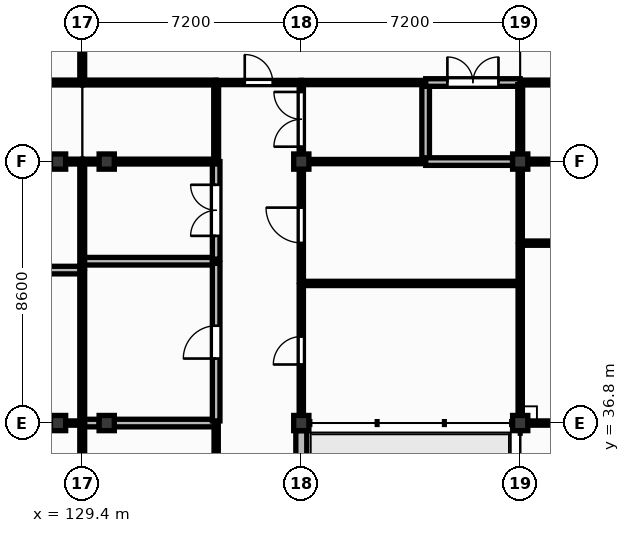
"""IFC4 building model, lengths in metres.
Left out: names, types, materials, properties, quantities, classifications, styles, units other than length and angle.
Written with IfcOpenShell. Run it as: python <this file> out.ifc"""

import sys

from ifc_helpers import new_model, si_unit, direction, frame, frame_2d, origin, origin_2d, place, context, subcontext, project, spatial, rectangle, extrude, element, fill, save


model = new_model("IFC4")
c1 = context("Model", 3, precision=1e-05, world=origin(), true_north=direction((0.0, 1.0)))
c2 = subcontext(c1, "Body", "Model", "MODEL_VIEW")
j1 = project(units=[si_unit("LENGTHUNIT", "METRE"), si_unit("PLANEANGLEUNIT", "RADIAN")], contexts=[c1])
p1 = place(None, origin())
s1 = spatial("IfcSite", under=j1, at=p1, CompositionType="ELEMENT")
p2 = place(p1, origin())
s2 = spatial("IfcBuilding", under=s1, at=p2, CompositionType="ELEMENT")
p3 = place(p2, frame((0.0, 0.0, 4.5)))
s3 = spatial("IfcBuildingStorey", under=s2, at=p3, CompositionType="ELEMENT", Elevation=4.5)
for number, where, z_axis, x_axis in (
    (1, (128.6, 36.8, 0.0), (0.0, 0.0, 1.0), (1.0, 0.0, 0.0)),
    (2, (128.6, 45.4, 0.0), (0.0, 0.0, 1.0), (1.0, 0.0, 0.0)),
    (3, (130.2, 36.8, 0.0), (0.0, 0.0, 1.0), (1.0, 0.0, 0.0)),
    (4, (130.2, 45.4, 0.0), (0.0, 0.0, 1.0), (1.0, 0.0, 0.0)),
    (5, (136.6, 36.8, 0.0), (0.0, 0.0, 1.0), (1.0, 0.0, 0.0)),
    (6, (136.6, 45.4, 0.0), (0.0, 0.0, 1.0), (1.0, 0.0, 0.0)),
    (7, (143.8, 36.8, 0.0), (0.0, 0.0, 1.0), (1.0, 0.0, 0.0)),
    (8, (143.8, 45.4, 0.0), (0.0, 0.0, 1.0), (1.0, 0.0, 0.0)),
):
    element("IfcColumn", number, at=place(p3, frame(where, z_axis=z_axis, x_axis=x_axis)), inside=s3, PredefinedType="COLUMN", context=c2, shape_type="SweptSolid", body=[
        extrude(rectangle(XDim=0.5, YDim=0.5, at=origin_2d()), origin(), (0.0, 0.0, 1.0), 4.22),
    ])
p4 = place(p3, frame((136.6, 27.45, 0.0), z_axis=(0.0, 0.0, 1.0), x_axis=(0.0, 1.0, 0.0)))
e9 = element("IfcWall", 9, at=p4, inside=s3, PredefinedType="SOLIDWALL", context=c2, shape_type="SweptSolid", body=[
    extrude(rectangle(XDim=9.1, YDim=0.36, at=frame_2d((4.55, 0.0))), origin(), (0.0, 0.0, 1.0), 3.52),
])
p5 = place(p4, frame((3.45, 0.0, 0.0)))
e10 = element("IfcOpeningElement", 10, at=p5, cuts=e9, PredefinedType="OPENING", context=c2, shape_type="SweptSolid", body=[
    extrude(rectangle(XDim=2.2, YDim=2.5, at=frame_2d((1.1, 1.25))), frame((0.0, 0.19, 0.0), z_axis=(0.0, -1.0, 0.0), x_axis=(1.0, 0.0, 0.0)), (0.0, 0.0, 1.0), 0.38),
])
p6 = place(p4, frame((0.915, 0.0, 1.5)))
e11 = element("IfcOpeningElement", 11, at=p6, cuts=e9, PredefinedType="OPENING", context=c2, shape_type="SweptSolid", body=[
    extrude(rectangle(XDim=1.68, YDim=1.25, at=frame_2d((0.84, 0.625))), frame((0.0, 0.19, 0.0), z_axis=(0.0, -1.0, 0.0), x_axis=(1.0, 0.0, 0.0)), (0.0, 0.0, 1.0), 0.38),
])
p7 = place(p4, frame((6.42, 0.0, 1.5)))
e12 = element("IfcOpeningElement", 12, at=p7, cuts=e9, PredefinedType="OPENING", context=c2, shape_type="SweptSolid", body=[
    extrude(rectangle(XDim=1.85, YDim=1.25, at=frame_2d((0.925, 0.625))), frame((0.0, 0.19, 0.0), z_axis=(0.0, -1.0, 0.0), x_axis=(1.0, 0.0, 0.0)), (0.0, 0.0, 1.0), 0.38),
])
p8 = place(p3, frame((128.85, 36.8, 0.0), z_axis=(0.0, 0.0, 1.0), x_axis=(1.0, 0.0, 0.0)))
e13 = element("IfcWall", 13, at=p8, inside=s3, PredefinedType="PARTITIONING", context=c2, shape_type="SweptSolid", body=[
    extrude(rectangle(XDim=0.545, YDim=0.14, at=frame_2d((0.272, 0.0))), origin(), (0.0, 0.0, 1.0), 4.18),
])
p9 = place(p3, frame((124.6, 41.831, 0.0), z_axis=(0.0, 0.0, 1.0), x_axis=(1.0, 0.0, 0.0)))
e14 = element("IfcWall", 14, at=p9, inside=s3, PredefinedType="SOLIDWALL", context=c2, shape_type="SweptSolid", body=[
    extrude(rectangle(XDim=4.795, YDim=0.25, at=frame_2d((2.397, 0.0))), origin(), (0.0, 0.0, 1.0), 4.18),
])
p10 = place(p3, frame((129.405, 36.8, 0.0), z_axis=(0.0, 0.0, 1.0), x_axis=(1.0, 0.0, 0.0)))
e15 = element("IfcWall", 15, at=p10, inside=s3, PredefinedType="SOLIDWALL", context=c2, shape_type="SweptSolid", body=[
    extrude(rectangle(XDim=0.545, YDim=0.25, at=frame_2d((0.272, 0.0))), origin(), (0.0, 0.0, 1.0), 4.18),
])
p11 = place(p3, frame((130.45, 36.8, 0.0), z_axis=(0.0, 0.0, 1.0), x_axis=(1.0, 0.0, 0.0)))
e16 = element("IfcWall", 16, at=p11, inside=s3, PredefinedType="SOLIDWALL", context=c2, shape_type="SweptSolid", body=[
    extrude(rectangle(XDim=3.35, YDim=0.25, at=frame_2d((1.675, 0.0))), origin(), (0.0, 0.0, 1.0), 3.52),
])
p12 = place(p3, frame((129.405, 42.123, 0.0), z_axis=(0.0, 0.0, 1.0), x_axis=(1.0, 0.0, 0.0)))
e17 = element("IfcWall", 17, at=p12, inside=s3, PredefinedType="SOLIDWALL", context=c2, shape_type="SweptSolid", body=[
    extrude(rectangle(XDim=4.395, YDim=0.25, at=frame_2d((2.198, 0.0))), origin(), (0.0, 0.0, 1.0), 4.18),
])
p13 = place(p3, frame((133.8, 31.091, 0.0), z_axis=(0.0, 0.0, 1.0), x_axis=(0.0, 1.0, 0.0)))
e18 = element("IfcWall", 18, at=p13, inside=s3, PredefinedType="PARTITIONING", context=c2, shape_type="SweptSolid", body=[
    extrude(rectangle(XDim=5.639, YDim=0.14, at=frame_2d((2.819, 0.0))), origin(), (0.0, 0.0, 1.0), 4.18),
])
p14 = place(p13, frame((2.24, 0.0, 0.0)))
e19 = element("IfcOpeningElement", 19, at=p14, cuts=e18, PredefinedType="OPENING", context=c2, shape_type="SweptSolid", body=[
    extrude(rectangle(XDim=1.16, YDim=2.1, at=frame_2d((0.58, 1.05))), frame((0.0, 0.08, 0.0), z_axis=(0.0, -1.0, 0.0), x_axis=(1.0, 0.0, 0.0)), (0.0, 0.0, 1.0), 0.16),
])
p15 = place(p3, frame((133.8, 36.87, 0.0), z_axis=(0.0, 0.0, 1.0), x_axis=(0.0, 1.0, 0.0)))
e20 = element("IfcWall", 20, at=p15, inside=s3, PredefinedType="SOLIDWALL", context=c2, shape_type="SweptSolid", body=[
    extrude(rectangle(XDim=5.183, YDim=0.25, at=frame_2d((2.591, 0.0))), origin(), (0.0, 0.0, 1.0), 4.18),
])
p16 = place(p15, frame((2.052, 0.0, 0.0)))
e21 = element("IfcOpeningElement", 21, at=p16, cuts=e20, PredefinedType="OPENING", context=c2, shape_type="SweptSolid", body=[
    extrude(rectangle(XDim=1.08, YDim=2.15, at=frame_2d((0.54, 1.075))), frame((0.0, 0.135, 0.0), z_axis=(0.0, -1.0, 0.0), x_axis=(1.0, 0.0, 0.0)), (0.0, 0.0, 1.0), 0.27),
])
p17 = place(p3, frame((133.8, 42.193, 0.0), z_axis=(0.0, 0.0, 1.0), x_axis=(0.0, 1.0, 0.0)))
e22 = element("IfcWall", 22, at=p17, inside=s3, PredefinedType="SOLIDWALL", context=c2, shape_type="SweptSolid", body=[
    extrude(rectangle(XDim=3.207, YDim=0.25, at=frame_2d((1.604, 0.0))), origin(), (0.0, 0.0, 1.0), 4.18),
])
p18 = place(p17, frame((0.763, 0.0, 0.0)))
e23 = element("IfcOpeningElement", 23, at=p18, cuts=e22, PredefinedType="OPENING", context=c2, shape_type="SweptSolid", body=[
    extrude(rectangle(XDim=1.68, YDim=2.3, at=frame_2d((0.84, 1.15))), frame((0.0, 0.135, 0.0), z_axis=(0.0, -1.0, 0.0), x_axis=(1.0, 0.0, 0.0)), (0.0, 0.0, 1.0), 0.27),
])
p19 = place(p3, frame((133.8, 48.0, 0.0), z_axis=(0.0, 0.0, 1.0), x_axis=(1.0, 0.0, 0.0)))
e24 = element("IfcWall", 24, at=p19, inside=s3, PredefinedType="PARTITIONING", context=c2, shape_type="SweptSolid", body=[
    extrude(rectangle(XDim=2.8, YDim=0.14, at=frame_2d((1.4, 0.0))), origin(), (0.0, 0.0, 1.0), 4.18),
])
p20 = place(p19, frame((0.94, 0.0, 0.0)))
e25 = element("IfcOpeningElement", 25, at=p20, cuts=e24, PredefinedType="OPENING", context=c2, shape_type="SweptSolid", body=[
    extrude(rectangle(XDim=0.92, YDim=2.1, at=frame_2d((0.46, 1.05))), frame((0.0, 0.08, 0.0), z_axis=(0.0, -1.0, 0.0), x_axis=(1.0, 0.0, 0.0)), (0.0, 0.0, 1.0), 0.16),
])
p21 = place(p3, frame((136.6, 37.05, 0.0), z_axis=(0.0, 0.0, 1.0), x_axis=(0.0, 1.0, 0.0)))
e26 = element("IfcWall", 26, at=p21, inside=s3, PredefinedType="PARTITIONING", context=c2, shape_type="SweptSolid", body=[
    extrude(rectangle(XDim=4.272, YDim=0.14, at=frame_2d((2.136, 0.0))), origin(), (0.0, 0.0, 1.0), 3.52),
])
p22 = place(p21, frame((1.676, 0.0, 0.0)))
e27 = element("IfcOpeningElement", 27, at=p22, cuts=e26, PredefinedType="OPENING", context=c2, shape_type="SweptSolid", body=[
    extrude(rectangle(XDim=0.92, YDim=2.1, at=frame_2d((0.46, 1.05))), frame((0.0, 0.08, 0.0), z_axis=(0.0, -1.0, 0.0), x_axis=(1.0, 0.0, 0.0)), (0.0, 0.0, 1.0), 0.16),
])
p23 = place(p3, frame((136.6, 41.462, 0.0), z_axis=(0.0, 0.0, 1.0), x_axis=(0.0, 1.0, 0.0)))
e28 = element("IfcWall", 28, at=p23, inside=s3, PredefinedType="PARTITIONING", context=c2, shape_type="SweptSolid", body=[
    extrude(rectangle(XDim=3.688, YDim=0.14, at=frame_2d((1.844, 0.0))), origin(), (0.0, 0.0, 1.0), 3.52),
])
p24 = place(p23, frame((1.264, 0.0, 0.0)))
e29 = element("IfcOpeningElement", 29, at=p24, cuts=e28, PredefinedType="OPENING", context=c2, shape_type="SweptSolid", body=[
    extrude(rectangle(XDim=1.16, YDim=2.1, at=frame_2d((0.58, 1.05))), frame((0.0, 0.08, 0.0), z_axis=(0.0, -1.0, 0.0), x_axis=(1.0, 0.0, 0.0)), (0.0, 0.0, 1.0), 0.16),
])
p25 = place(p3, frame((136.6, 41.392, 0.0), z_axis=(0.0, 0.0, 1.0), x_axis=(1.0, 0.0, 0.0)))
e30 = element("IfcWall", 30, at=p25, inside=s3, PredefinedType="PARTITIONING", context=c2, shape_type="SweptSolid", body=[
    extrude(rectangle(XDim=7.2, YDim=0.14, at=frame_2d((3.6, 0.0))), origin(), (0.0, 0.0, 1.0), 4.18),
])
p26 = place(p3, frame((136.6, 45.65, 0.0), z_axis=(0.0, 0.0, 1.0), x_axis=(0.0, 1.0, 0.0)))
e31 = element("IfcWall", 31, at=p26, inside=s3, PredefinedType="PARTITIONING", context=c2, shape_type="SweptSolid", body=[
    extrude(rectangle(XDim=2.28, YDim=0.14, at=frame_2d((1.14, 0.0))), origin(), (0.0, 0.0, 1.0), 3.52),
])
p27 = place(p26, frame((0.24, 0.0, 0.0)))
e32 = element("IfcOpeningElement", 32, at=p27, cuts=e31, PredefinedType="OPENING", context=c2, shape_type="SweptSolid", body=[
    extrude(rectangle(XDim=1.8, YDim=2.3, at=frame_2d((0.9, 1.15))), frame((0.0, 0.08, 0.0), z_axis=(0.0, -1.0, 0.0), x_axis=(1.0, 0.0, 0.0)), (0.0, 0.0, 1.0), 0.16),
])
p28 = place(p3, frame((136.85, 45.4, 0.0), z_axis=(0.0, 0.0, 1.0), x_axis=(1.0, 0.0, 0.0)))
e33 = element("IfcWall", 33, at=p28, inside=s3, PredefinedType="PARTITIONING", context=c2, shape_type="SweptSolid", body=[
    extrude(rectangle(XDim=3.84, YDim=0.14, at=frame_2d((1.92, 0.0))), origin(), (0.0, 0.0, 1.0), 3.52),
])
p29 = place(p3, frame((136.6, 48.0, 0.0), z_axis=(0.0, 0.0, 1.0), x_axis=(1.0, 0.0, 0.0)))
e34 = element("IfcWall", 34, at=p29, inside=s3, PredefinedType="PARTITIONING", context=c2, shape_type="SweptSolid", body=[
    extrude(rectangle(XDim=4.09, YDim=0.14, at=frame_2d((2.045, 0.0))), origin(), (0.0, 0.0, 1.0), 4.18),
])
p30 = place(p3, frame((140.69, 45.47, 0.0), z_axis=(0.0, 0.0, 1.0), x_axis=(0.0, 1.0, 0.0)))
e35 = element("IfcWall", 35, at=p30, inside=s3, PredefinedType="SOLIDWALL", context=c2, shape_type="SweptSolid", body=[
    extrude(rectangle(XDim=2.46, YDim=0.25, at=frame_2d((1.23, 0.0))), origin(), (0.0, 0.0, 1.0), 4.18),
])
p31 = place(p3, frame((140.69, 45.4, 0.0), z_axis=(0.0, 0.0, 1.0), x_axis=(1.0, 0.0, 0.0)))
e36 = element("IfcWall", 36, at=p31, inside=s3, PredefinedType="SOLIDWALL", context=c2, shape_type="SweptSolid", body=[
    extrude(rectangle(XDim=2.86, YDim=0.25, at=frame_2d((1.43, 0.0))), origin(), (0.0, 0.0, 1.0), 3.52),
])
p32 = place(p3, frame((140.69, 48.0, 0.0), z_axis=(0.0, 0.0, 1.0), x_axis=(1.0, 0.0, 0.0)))
e37 = element("IfcWall", 37, at=p32, inside=s3, PredefinedType="SOLIDWALL", context=c2, shape_type="SweptSolid", body=[
    extrude(rectangle(XDim=3.11, YDim=0.25, at=frame_2d((1.555, 0.0))), origin(), (0.0, 0.0, 1.0), 4.18),
])
p33 = place(p32, frame((0.715, 0.0, 0.0)))
e38 = element("IfcOpeningElement", 38, at=p33, cuts=e37, PredefinedType="OPENING", context=c2, shape_type="SweptSolid", body=[
    extrude(rectangle(XDim=1.68, YDim=2.3, at=frame_2d((0.84, 1.15))), frame((0.0, 0.135, 0.0), z_axis=(0.0, -1.0, 0.0), x_axis=(1.0, 0.0, 0.0)), (0.0, 0.0, 1.0), 0.27),
])
p34 = place(p3, frame((143.8, 37.05, 0.0), z_axis=(0.0, 0.0, 1.0), x_axis=(0.0, 1.0, 0.0)))
e39 = element("IfcWall", 39, at=p34, inside=s3, PredefinedType="PARTITIONING", context=c2, shape_type="SweptSolid", body=[
    extrude(rectangle(XDim=4.272, YDim=0.14, at=frame_2d((2.136, 0.0))), origin(), (0.0, 0.0, 1.0), 3.52),
])
p35 = place(p3, frame((144.05, 36.8, 0.0), z_axis=(0.0, 0.0, 1.0), x_axis=(1.0, 0.0, 0.0)))
e40 = element("IfcWall", 40, at=p35, inside=s3, PredefinedType="PARTITIONING", context=c2, shape_type="SweptSolid", body=[
    extrude(rectangle(XDim=3.55, YDim=0.14, at=frame_2d((1.775, 0.0))), origin(), (0.0, 0.0, 1.0), 3.58),
])
p36 = place(p3, frame((143.8, 41.462, 0.0), z_axis=(0.0, 0.0, 1.0), x_axis=(0.0, 1.0, 0.0)))
e41 = element("IfcWall", 41, at=p36, inside=s3, PredefinedType="PARTITIONING", context=c2, shape_type="SweptSolid", body=[
    extrude(rectangle(XDim=1.185, YDim=0.14, at=frame_2d((0.593, 0.0))), origin(), (0.0, 0.0, 1.0), 3.52),
])
p37 = place(p3, frame((143.8, 42.787, 0.0), z_axis=(0.0, 0.0, 1.0), x_axis=(0.0, 1.0, 0.0)))
e42 = element("IfcWall", 42, at=p37, inside=s3, PredefinedType="PARTITIONING", context=c2, shape_type="SweptSolid", body=[
    extrude(rectangle(XDim=2.363, YDim=0.14, at=frame_2d((1.181, 0.0))), origin(), (0.0, 0.0, 1.0), 3.52),
])
p38 = place(p3, frame((143.8, 42.717, 0.0), z_axis=(0.0, 0.0, 1.0), x_axis=(1.0, 0.0, 0.0)))
e43 = element("IfcWall", 43, at=p38, inside=s3, PredefinedType="PARTITIONING", context=c2, shape_type="SweptSolid", body=[
    extrude(rectangle(XDim=3.8, YDim=0.14, at=frame_2d((1.9, 0.0))), origin(), (0.0, 0.0, 1.0), 4.18),
])
p39 = place(p3, frame((124.6, 48.0, 0.0), z_axis=(0.0, 0.0, 1.0), x_axis=(1.0, 0.0, 0.0)))
e44 = element("IfcWall", 44, at=p39, inside=s3, PredefinedType="PARTITIONING", context=c2, shape_type="SweptSolid", body=[
    extrude(rectangle(XDim=4.795, YDim=0.16, at=frame_2d((2.397, 0.0))), origin(), (0.0, 0.0, 1.0), 4.18),
])
p40 = place(p3, frame((129.395, 48.0, 0.0), z_axis=(0.0, 0.0, 1.0), x_axis=(0.0, 1.0, 0.0)))
e45 = element("IfcWall", 45, at=p40, inside=s3, PredefinedType="PARTITIONING", context=c2, shape_type="SweptSolid", body=[
    extrude(rectangle(XDim=2.6, YDim=0.16, at=frame_2d((1.3, 0.0))), origin(), (0.0, 0.0, 1.0), 4.18),
])
p41 = place(p3, frame((129.405, 48.0, 0.0), z_axis=(0.0, 0.0, 1.0), x_axis=(1.0, 0.0, 0.0)))
e46 = element("IfcWall", 46, at=p41, inside=s3, PredefinedType="PARTITIONING", context=c2, shape_type="SweptSolid", body=[
    extrude(rectangle(XDim=4.395, YDim=0.16, at=frame_2d((2.198, 0.0))), origin(), (0.0, 0.0, 1.0), 4.18),
])
p42 = place(p3, frame((143.8, 48.0, 0.0), z_axis=(0.0, 0.0, 1.0), x_axis=(1.0, 0.0, 0.0)))
e47 = element("IfcWall", 47, at=p42, inside=s3, PredefinedType="PARTITIONING", context=c2, shape_type="SweptSolid", body=[
    extrude(rectangle(XDim=3.8, YDim=0.16, at=frame_2d((1.9, 0.0))), origin(), (0.0, 0.0, 1.0), 4.18),
])
p43 = place(p3, frame((133.8, 45.4, 0.0), z_axis=(0.0, 0.0, 1.0), x_axis=(0.0, 1.0, 0.0)))
e48 = element("IfcWall", 48, at=p43, inside=s3, PredefinedType="PARTITIONING", context=c2, shape_type="SweptSolid", body=[
    extrude(rectangle(XDim=2.53, YDim=0.16, at=frame_2d((1.265, 0.0))), origin(), (0.0, 0.0, 1.0), 4.18),
])
p44 = place(p3, frame((129.395, 30.764, 0.0), z_axis=(0.0, 0.0, 1.0), x_axis=(0.0, 1.0, 0.0)))
e49 = element("IfcWall", 49, at=p44, inside=s3, PredefinedType="PARTITIONING", context=c2, shape_type="SweptSolid", body=[
    extrude(rectangle(XDim=5.966, YDim=0.16, at=frame_2d((2.983, 0.0))), origin(), (0.0, 0.0, 1.0), 4.18),
])
p45 = place(p3, frame((129.395, 36.87, 0.0), z_axis=(0.0, 0.0, 1.0), x_axis=(0.0, 1.0, 0.0)))
e50 = element("IfcWall", 50, at=p45, inside=s3, PredefinedType="PARTITIONING", context=c2, shape_type="SweptSolid", body=[
    extrude(rectangle(XDim=4.891, YDim=0.16, at=frame_2d((2.445, 0.0))), origin(), (0.0, 0.0, 1.0), 4.18),
])
p46 = place(p3, frame((129.395, 41.901, 0.0), z_axis=(0.0, 0.0, 1.0), x_axis=(0.0, 1.0, 0.0)))
e51 = element("IfcWall", 51, at=p46, inside=s3, PredefinedType="PARTITIONING", context=c2, shape_type="SweptSolid", body=[
    extrude(rectangle(XDim=3.499, YDim=0.16, at=frame_2d((1.75, 0.0))), origin(), (0.0, 0.0, 1.0), 4.18),
])
p47 = place(p3, frame((129.395, 45.4, 0.0), z_axis=(0.0, 0.0, 1.0), x_axis=(-1.0, 0.0, 0.0)))
e52 = element("IfcWall", 52, at=p47, inside=s3, PredefinedType="PARTITIONING", context=c2, shape_type="SweptSolid", body=[
    extrude(rectangle(XDim=0.545, YDim=0.16, at=frame_2d((0.272, 0.0))), origin(), (0.0, 0.0, 1.0), 4.18),
])
p48 = place(p3, frame((133.8, 45.4, 0.0), z_axis=(0.0, 0.0, 1.0), x_axis=(-1.0, 0.0, 0.0)))
e53 = element("IfcWall", 53, at=p48, inside=s3, PredefinedType="PARTITIONING", context=c2, shape_type="SweptSolid", body=[
    extrude(rectangle(XDim=3.35, YDim=0.16, at=frame_2d((1.675, 0.0))), origin(), (0.0, 0.0, 1.0), 3.52),
])
p49 = place(p3, frame((129.95, 45.4, 0.0), z_axis=(0.0, 0.0, 1.0), x_axis=(-1.0, 0.0, 0.0)))
e54 = element("IfcWall", 54, at=p49, inside=s3, PredefinedType="PARTITIONING", context=c2, shape_type="SweptSolid", body=[
    extrude(rectangle(XDim=0.545, YDim=0.16, at=frame_2d((0.272, 0.0))), origin(), (0.0, 0.0, 1.0), 4.18),
])
p50 = place(p3, frame((143.8, 45.65, 0.0), z_axis=(0.0, 0.0, 1.0), x_axis=(0.0, 1.0, 0.0)))
e55 = element("IfcWall", 55, at=p50, inside=s3, PredefinedType="PARTITIONING", context=c2, shape_type="SweptSolid", body=[
    extrude(rectangle(XDim=2.28, YDim=0.16, at=frame_2d((1.14, 0.0))), origin(), (0.0, 0.0, 1.0), 3.52),
])
p51 = place(p3, frame((147.6, 45.4, 0.0), z_axis=(0.0, 0.0, 1.0), x_axis=(-1.0, 0.0, 0.0)))
e56 = element("IfcWall", 56, at=p51, inside=s3, PredefinedType="PARTITIONING", context=c2, shape_type="SweptSolid", body=[
    extrude(rectangle(XDim=3.55, YDim=0.16, at=frame_2d((1.775, 0.0))), origin(), (0.0, 0.0, 1.0), 3.62),
])
p52 = place(p20, origin())
e57 = element("IfcDoor", 57, at=p52, inside=s3, OperationType="SINGLE_SWING_LEFT", PredefinedType="DOOR", context=c2, shape_type="SweptSolid", body=[
    extrude(rectangle(XDim=0.92, YDim=2.1, at=frame_2d((0.46, 1.05))), frame((0.0, 0.025, 0.0), z_axis=(0.0, -1.0, 0.0), x_axis=(1.0, 0.0, 0.0)), (0.0, 0.0, 1.0), 0.05),
])
fill(e25, e57)
p53 = place(p16, origin())
e58 = element("IfcDoor", 58, at=p53, inside=s3, OperationType="SINGLE_SWING_LEFT", PredefinedType="DOOR", context=c2, shape_type="SweptSolid", body=[
    extrude(rectangle(XDim=1.08, YDim=2.15, at=frame_2d((0.54, 1.075))), frame((0.0, 0.025, 0.0), z_axis=(0.0, -1.0, 0.0), x_axis=(1.0, 0.0, 0.0)), (0.0, 0.0, 1.0), 0.05),
])
fill(e21, e58)
p54 = place(p18, origin())
e59 = element("IfcDoor", 59, at=p54, inside=s3, OperationType="DOUBLE_DOOR_SINGLE_SWING", PredefinedType="DOOR", context=c2, shape_type="SweptSolid", body=[
    extrude(rectangle(XDim=1.68, YDim=2.3, at=frame_2d((0.84, 1.15))), frame((0.0, 0.025, 0.0), z_axis=(0.0, -1.0, 0.0), x_axis=(1.0, 0.0, 0.0)), (0.0, 0.0, 1.0), 0.05),
])
fill(e23, e59)
p55 = place(p22, origin())
e60 = element("IfcDoor", 60, at=p55, inside=s3, OperationType="SINGLE_SWING_LEFT", PredefinedType="DOOR", context=c2, shape_type="SweptSolid", body=[
    extrude(rectangle(XDim=0.92, YDim=2.1, at=frame_2d((0.46, 1.05))), frame((0.0, 0.025, 0.0), z_axis=(0.0, -1.0, 0.0), x_axis=(1.0, 0.0, 0.0)), (0.0, 0.0, 1.0), 0.05),
])
fill(e27, e60)
p56 = place(p24, origin())
e61 = element("IfcDoor", 61, at=p56, inside=s3, OperationType="SINGLE_SWING_RIGHT", PredefinedType="DOOR", context=c2, shape_type="SweptSolid", body=[
    extrude(rectangle(XDim=1.16, YDim=2.1, at=frame_2d((0.58, 1.05))), frame((0.0, 0.025, 0.0), z_axis=(0.0, -1.0, 0.0), x_axis=(1.0, 0.0, 0.0)), (0.0, 0.0, 1.0), 0.05),
])
fill(e29, e61)
p57 = place(p27, origin())
e62 = element("IfcDoor", 62, at=p57, inside=s3, OperationType="DOUBLE_DOOR_SINGLE_SWING", PredefinedType="DOOR", context=c2, shape_type="SweptSolid", body=[
    extrude(rectangle(XDim=1.8, YDim=2.3, at=frame_2d((0.9, 1.15))), frame((0.0, 0.025, 0.0), z_axis=(0.0, -1.0, 0.0), x_axis=(1.0, 0.0, 0.0)), (0.0, 0.0, 1.0), 0.05),
])
fill(e32, e62)
p58 = place(p33, origin())
e63 = element("IfcDoor", 63, at=p58, inside=s3, OperationType="DOUBLE_DOOR_SINGLE_SWING", PredefinedType="DOOR", context=c2, shape_type="SweptSolid", body=[
    extrude(rectangle(XDim=1.68, YDim=2.3, at=frame_2d((0.84, 1.15))), frame((0.0, 0.025, 0.0), z_axis=(0.0, -1.0, 0.0), x_axis=(1.0, 0.0, 0.0)), (0.0, 0.0, 1.0), 0.05),
])
fill(e38, e63)
save(model, sys.argv[1])
